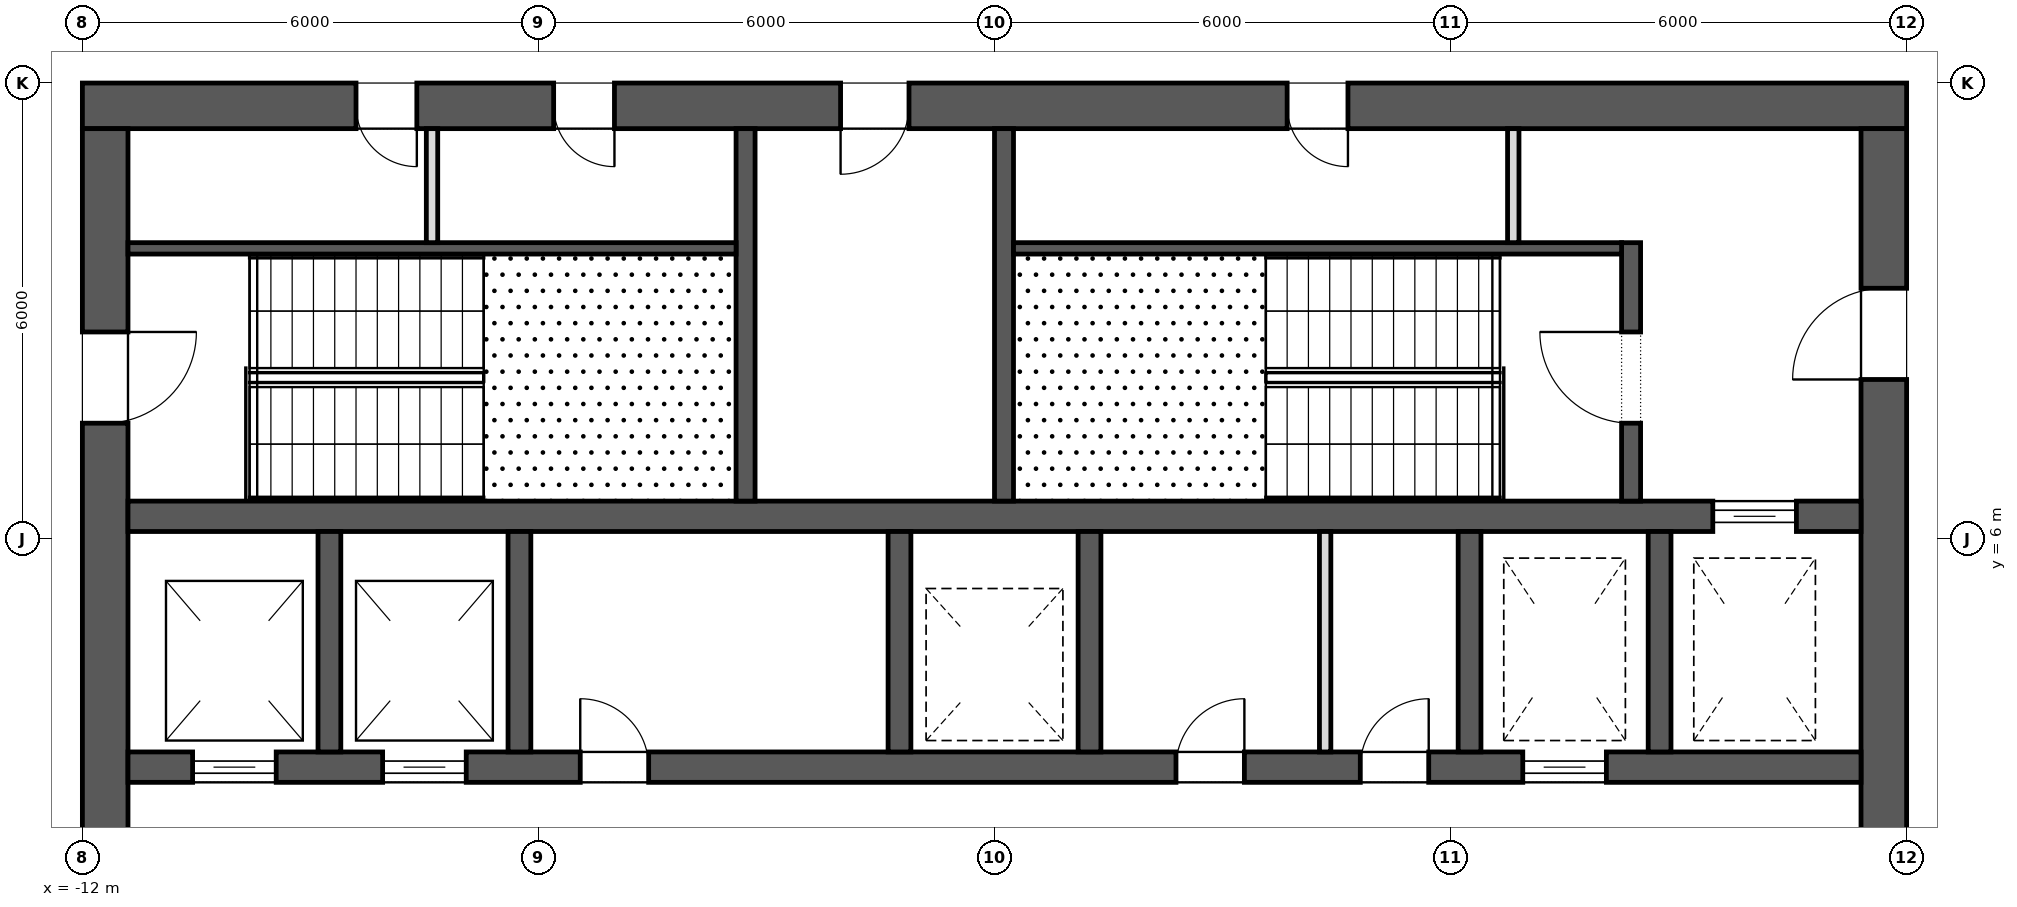
"""IFC4 building model, lengths in metres.
Left out: names, types, materials, properties, quantities, classifications, styles, units other than length and angle.
Written with IfcOpenShell. Run it as: python <this file> out.ifc"""

import sys

from ifc_helpers import new_model, si_unit, direction, frame, frame_2d, origin, place, context, subcontext, project, spatial, rectangle, extrude, element, fill, save


model = new_model("IFC4")
c1 = context("Model", 3, precision=1e-05, world=origin(), true_north=direction((0.0, 1.0)))
c2 = subcontext(c1, "Body", "Model", "MODEL_VIEW")
j1 = project(units=[si_unit("LENGTHUNIT", "METRE"), si_unit("PLANEANGLEUNIT", "RADIAN")], contexts=[c1])
p1 = place(None, origin())
s1 = spatial("IfcSite", under=j1, at=p1, CompositionType="ELEMENT")
p2 = place(p1, origin())
s2 = spatial("IfcBuilding", under=s1, at=p2, CompositionType="ELEMENT")
p3 = place(p2, frame((0.0, 0.0, 268.3)))
s3 = spatial("IfcBuildingStorey", under=s2, at=p3, CompositionType="ELEMENT", Elevation=268.3)
p4 = place(p3, frame((-12.0, 11.7, 0.0), z_axis=(0.0, 0.0, 1.0), x_axis=(1.0, 0.0, 0.0)))
e1 = element("IfcWall", 1, at=p4, inside=s3, PredefinedType="SHEAR", context=c2, shape_type="SweptSolid", body=[
    extrude(rectangle(XDim=24.0, YDim=0.6, at=frame_2d((12.0, 0.0))), origin(), (0.0, 0.0, 1.0), 4.0),
])
p5 = place(p4, frame((9.975, 0.0, 0.0)))
e2 = element("IfcOpeningElement", 2, at=p5, cuts=e1, PredefinedType="OPENING", context=c2, shape_type="SweptSolid", body=[
    extrude(rectangle(XDim=0.9, YDim=2.1, at=frame_2d((0.45, 1.05))), frame((0.0, 0.312, 0.0), z_axis=(0.0, -1.0, 0.0), x_axis=(1.0, 0.0, 0.0)), (0.0, 0.0, 1.0), 0.624),
])
p6 = place(p4, frame((3.6, 0.0, 0.0)))
e3 = element("IfcOpeningElement", 3, at=p6, cuts=e1, PredefinedType="OPENING", context=c2, shape_type="SweptSolid", body=[
    extrude(rectangle(XDim=0.8, YDim=2.1, at=frame_2d((0.4, 1.05))), frame((0.0, 0.312, 0.0), z_axis=(0.0, -1.0, 0.0), x_axis=(1.0, 0.0, 0.0)), (0.0, 0.0, 1.0), 0.624),
])
p7 = place(p4, frame((6.2, 0.0, 0.0)))
e4 = element("IfcOpeningElement", 4, at=p7, cuts=e1, PredefinedType="OPENING", context=c2, shape_type="SweptSolid", body=[
    extrude(rectangle(XDim=0.8, YDim=2.1, at=frame_2d((0.4, 1.05))), frame((0.0, 0.312, 0.0), z_axis=(0.0, -1.0, 0.0), x_axis=(1.0, 0.0, 0.0)), (0.0, 0.0, 1.0), 0.624),
])
p8 = place(p4, frame((15.85, 0.0, 0.0)))
e5 = element("IfcOpeningElement", 5, at=p8, cuts=e1, PredefinedType="OPENING", context=c2, shape_type="SweptSolid", body=[
    extrude(rectangle(XDim=0.8, YDim=2.1, at=frame_2d((0.4, 1.05))), frame((0.0, 0.312, 0.0), z_axis=(0.0, -1.0, 0.0), x_axis=(1.0, 0.0, 0.0)), (0.0, 0.0, 1.0), 0.624),
])
p9 = place(p3, frame((11.7, -11.4, 0.0), z_axis=(0.0, 0.0, 1.0), x_axis=(0.0, 1.0, 0.0)))
e6 = element("IfcWall", 6, at=p9, inside=s3, PredefinedType="SHEAR", context=c2, shape_type="SweptSolid", body=[
    extrude(rectangle(XDim=22.8, YDim=0.6, at=frame_2d((11.4, 0.0))), origin(), (0.0, 0.0, 1.0), 4.0),
])
p10 = place(p9, frame((10.2, 0.0, 0.0)))
e7 = element("IfcOpeningElement", 7, at=p10, cuts=e6, PredefinedType="OPENING", context=c2, shape_type="SweptSolid", body=[
    extrude(rectangle(XDim=2.4, YDim=2.1, at=frame_2d((1.2, 1.05))), frame((0.0, 0.312, 0.0), z_axis=(0.0, -1.0, 0.0), x_axis=(1.0, 0.0, 0.0)), (0.0, 0.0, 1.0), 0.624),
])
p11 = place(p9, frame((19.5, 0.0, 0.0)))
e8 = element("IfcOpeningElement", 8, at=p11, cuts=e6, PredefinedType="OPENING", context=c2, shape_type="SweptSolid", body=[
    extrude(rectangle(XDim=1.2, YDim=2.1, at=frame_2d((0.6, 1.05))), frame((0.0, 0.312, 0.0), z_axis=(0.0, -1.0, 0.0), x_axis=(1.0, 0.0, 0.0)), (0.0, 0.0, 1.0), 0.624),
])
p12 = place(p9, frame((2.1, 0.0, 0.0)))
e9 = element("IfcOpeningElement", 9, at=p12, cuts=e6, PredefinedType="OPENING", context=c2, shape_type="SweptSolid", body=[
    extrude(rectangle(XDim=1.2, YDim=2.1, at=frame_2d((0.6, 1.05))), frame((0.0, 0.312, 0.0), z_axis=(0.0, -1.0, 0.0), x_axis=(1.0, 0.0, 0.0)), (0.0, 0.0, 1.0), 0.624),
])
p13 = place(p3, frame((-11.7, -11.4, 0.0), z_axis=(0.0, 0.0, 1.0), x_axis=(0.0, 1.0, 0.0)))
e10 = element("IfcWall", 10, at=p13, inside=s3, PredefinedType="SHEAR", context=c2, shape_type="SweptSolid", body=[
    extrude(rectangle(XDim=22.8, YDim=0.6, at=frame_2d((11.4, 0.0))), origin(), (0.0, 0.0, 1.0), 4.0),
])
p14 = place(p13, frame((10.2, 0.0, 0.0)))
e11 = element("IfcOpeningElement", 11, at=p14, cuts=e10, PredefinedType="OPENING", context=c2, shape_type="SweptSolid", body=[
    extrude(rectangle(XDim=2.4, YDim=2.1, at=frame_2d((1.2, 1.05))), frame((0.0, 0.312, 0.0), z_axis=(0.0, -1.0, 0.0), x_axis=(1.0, 0.0, 0.0)), (0.0, 0.0, 1.0), 0.624),
])
p15 = place(p13, frame((18.925, 0.0, 0.0)))
e12 = element("IfcOpeningElement", 12, at=p15, cuts=e10, PredefinedType="OPENING", context=c2, shape_type="SweptSolid", body=[
    extrude(rectangle(XDim=1.2, YDim=2.1, at=frame_2d((0.6, 1.05))), frame((0.0, 0.312, 0.0), z_axis=(0.0, -1.0, 0.0), x_axis=(1.0, 0.0, 0.0)), (0.0, 0.0, 1.0), 0.624),
])
p16 = place(p13, frame((2.675, 0.0, 0.0)))
e13 = element("IfcOpeningElement", 13, at=p16, cuts=e10, PredefinedType="OPENING", context=c2, shape_type="SweptSolid", body=[
    extrude(rectangle(XDim=1.2, YDim=2.1, at=frame_2d((0.6, 1.05))), frame((0.0, 0.312, 0.0), z_axis=(0.0, -1.0, 0.0), x_axis=(1.0, 0.0, 0.0)), (0.0, 0.0, 1.0), 0.624),
])
p17 = place(p3, frame((-11.4, 3.0, 0.0), z_axis=(0.0, 0.0, 1.0), x_axis=(1.0, 0.0, 0.0)))
e14 = element("IfcWall", 14, at=p17, inside=s3, PredefinedType="SHEAR", context=c2, shape_type="SweptSolid", body=[
    extrude(rectangle(XDim=22.8, YDim=0.4, at=frame_2d((11.4, 0.0))), origin(), (0.0, 0.0, 1.0), 4.0),
])
p18 = place(p17, frame((0.85, 0.0, 0.0)))
e15 = element("IfcOpeningElement", 15, at=p18, cuts=e14, PredefinedType="OPENING", context=c2, shape_type="SweptSolid", body=[
    extrude(rectangle(XDim=1.1, YDim=2.1, at=frame_2d((0.55, 1.05))), frame((0.0, 0.212, 0.0), z_axis=(0.0, -1.0, 0.0), x_axis=(1.0, 0.0, 0.0)), (0.0, 0.0, 1.0), 0.424),
])
p19 = place(p17, frame((3.35, 0.0, 0.0)))
e16 = element("IfcOpeningElement", 16, at=p19, cuts=e14, PredefinedType="OPENING", context=c2, shape_type="SweptSolid", body=[
    extrude(rectangle(XDim=1.1, YDim=2.1, at=frame_2d((0.55, 1.05))), frame((0.0, 0.212, 0.0), z_axis=(0.0, -1.0, 0.0), x_axis=(1.0, 0.0, 0.0)), (0.0, 0.0, 1.0), 0.424),
])
p20 = place(p17, frame((18.35, 0.0, 0.0)))
e17 = element("IfcOpeningElement", 17, at=p20, cuts=e14, PredefinedType="OPENING", context=c2, shape_type="SweptSolid", body=[
    extrude(rectangle(XDim=1.1, YDim=2.1, at=frame_2d((0.55, 1.05))), frame((0.0, 0.212, 0.0), z_axis=(0.0, -1.0, 0.0), x_axis=(1.0, 0.0, 0.0)), (0.0, 0.0, 1.0), 0.424),
])
p21 = place(p17, frame((13.788, 0.0, 0.0)))
e18 = element("IfcOpeningElement", 18, at=p21, cuts=e14, PredefinedType="OPENING", context=c2, shape_type="SweptSolid", body=[
    extrude(rectangle(XDim=0.9, YDim=2.1, at=frame_2d((0.45, 1.05))), frame((0.0, 0.212, 0.0), z_axis=(0.0, -1.0, 0.0), x_axis=(1.0, 0.0, 0.0)), (0.0, 0.0, 1.0), 0.424),
])
p22 = place(p17, frame((16.212, 0.0, 0.0)))
e19 = element("IfcOpeningElement", 19, at=p22, cuts=e14, PredefinedType="OPENING", context=c2, shape_type="SweptSolid", body=[
    extrude(rectangle(XDim=0.9, YDim=2.1, at=frame_2d((0.45, 1.05))), frame((0.0, 0.212, 0.0), z_axis=(0.0, -1.0, 0.0), x_axis=(1.0, 0.0, 0.0)), (0.0, 0.0, 1.0), 0.424),
])
p23 = place(p17, frame((5.95, 0.0, 0.0)))
e20 = element("IfcOpeningElement", 20, at=p23, cuts=e14, PredefinedType="OPENING", context=c2, shape_type="SweptSolid", body=[
    extrude(rectangle(XDim=0.9, YDim=2.1, at=frame_2d((0.45, 1.05))), frame((0.0, 0.212, 0.0), z_axis=(0.0, -1.0, 0.0), x_axis=(1.0, 0.0, 0.0)), (0.0, 0.0, 1.0), 0.424),
])
p24 = place(p3, frame((-11.4, 6.3, 0.0), z_axis=(0.0, 0.0, 1.0), x_axis=(1.0, 0.0, 0.0)))
e21 = element("IfcWall", 21, at=p24, inside=s3, PredefinedType="SHEAR", context=c2, shape_type="SweptSolid", body=[
    extrude(rectangle(XDim=22.8, YDim=0.4, at=frame_2d((11.4, 0.0))), origin(), (0.0, 0.0, 1.0), 4.0),
])
p25 = place(p24, frame((20.85, 0.0, 0.0)))
e22 = element("IfcOpeningElement", 22, at=p25, cuts=e21, PredefinedType="OPENING", context=c2, shape_type="SweptSolid", body=[
    extrude(rectangle(XDim=1.1, YDim=2.1, at=frame_2d((0.55, 1.05))), frame((0.0, 0.212, 0.0), z_axis=(0.0, -1.0, 0.0), x_axis=(1.0, 0.0, 0.0)), (0.0, 0.0, 1.0), 0.424),
])
for number, where, z_axis, x_axis in (
    (23, (-8.75, 3.2, 0.0), (0.0, 0.0, 1.0), (0.0, 1.0, 0.0)),
    (24, (-6.25, 3.2, 0.0), (0.0, 0.0, 1.0), (0.0, 1.0, 0.0)),
    (25, (-1.25, 3.2, 0.0), (0.0, 0.0, 1.0), (0.0, 1.0, 0.0)),
    (26, (1.25, 3.2, 0.0), (0.0, 0.0, 1.0), (0.0, 1.0, 0.0)),
    (27, (6.25, 3.2, 0.0), (0.0, 0.0, 1.0), (0.0, 1.0, 0.0)),
    (28, (8.75, 3.2, 0.0), (0.0, 0.0, 1.0), (0.0, 1.0, 0.0)),
):
    element("IfcWall", number, at=place(p3, frame(where, z_axis=z_axis, x_axis=x_axis)), inside=s3, PredefinedType="SHEAR", context=c2, shape_type="SweptSolid", body=[
        extrude(rectangle(XDim=2.9, YDim=0.3, at=frame_2d((1.45, 0.0))), origin(), (0.0, 0.0, 1.0), 4.0),
    ])
for number, where, z_axis, x_axis in (
    (29, (-3.275, 6.5, 0.0), (0.0, 0.0, 1.0), (0.0, 1.0, 0.0)),
    (30, (0.125, 6.5, 0.0), (0.0, 0.0, 1.0), (0.0, 1.0, 0.0)),
):
    element("IfcWall", number, at=place(p3, frame(where, z_axis=z_axis, x_axis=x_axis)), inside=s3, PredefinedType="SHEAR", context=c2, shape_type="SweptSolid", body=[
        extrude(rectangle(XDim=4.9, YDim=0.25, at=frame_2d((2.45, 0.0))), origin(), (0.0, 0.0, 1.0), 3.7),
    ])
p26 = place(p3, frame((8.375, 6.5, 0.0), z_axis=(0.0, 0.0, 1.0), x_axis=(0.0, 1.0, 0.0)))
e31 = element("IfcWall", 31, at=p26, inside=s3, PredefinedType="SHEAR", context=c2, shape_type="SweptSolid", body=[
    extrude(rectangle(XDim=3.4, YDim=0.25, at=frame_2d((1.7, 0.0))), origin(), (0.0, 0.0, 1.0), 3.7),
])
p27 = place(p26, frame((1.025, 0.0, 0.0)))
e32 = element("IfcOpeningElement", 32, at=p27, cuts=e31, PredefinedType="OPENING", context=c2, shape_type="SweptSolid", body=[
    extrude(rectangle(XDim=1.2, YDim=2.1, at=frame_2d((0.6, 1.05))), frame((0.0, 0.137, 0.0), z_axis=(0.0, -1.0, 0.0), x_axis=(1.0, 0.0, 0.0)), (0.0, 0.0, 1.0), 0.274),
])
for number, where, z_axis, x_axis in (
    (33, (-11.4, 9.825, 0.0), (0.0, 0.0, 1.0), (1.0, 0.0, 0.0)),
    (34, (0.25, 9.825, 0.0), (0.0, 0.0, 1.0), (1.0, 0.0, 0.0)),
):
    element("IfcWall", number, at=place(p3, frame(where, z_axis=z_axis, x_axis=x_axis)), inside=s3, PredefinedType="SHEAR", context=c2, shape_type="SweptSolid", body=[
        extrude(rectangle(XDim=8.0, YDim=0.15, at=frame_2d((4.0, 0.0))), origin(), (0.0, 0.0, 1.0), 3.7),
    ])
for number, where, z_axis, x_axis in (
    (35, (-7.4, 9.9, 0.0), (0.0, 0.0, 1.0), (0.0, 1.0, 0.0)),
    (36, (6.825, 9.9, 0.0), (0.0, 0.0, 1.0), (0.0, 1.0, 0.0)),
):
    element("IfcWall", number, at=place(p3, frame(where, z_axis=z_axis, x_axis=x_axis)), inside=s3, PredefinedType="PARTITIONING", context=c2, shape_type="SweptSolid", body=[
        extrude(rectangle(XDim=1.5, YDim=0.15, at=frame_2d((0.75, 0.0))), origin(), (0.0, 0.0, 1.0), 3.7),
    ])
p28 = place(p3, frame((4.35, 3.2, 0.0), z_axis=(0.0, 0.0, 1.0), x_axis=(0.0, 1.0, 0.0)))
e37 = element("IfcWall", 37, at=p28, inside=s3, PredefinedType="PARTITIONING", context=c2, shape_type="SweptSolid", body=[
    extrude(rectangle(XDim=2.9, YDim=0.15, at=frame_2d((1.45, 0.0))), origin(), (0.0, 0.0, 1.0), 3.7),
])
p29 = place(p25, origin())
e38 = element("IfcDoor", 38, at=p29, inside=s3, OperationType="SLIDING_TO_LEFT", PredefinedType="DOOR", context=c2, shape_type="SweptSolid", body=[
    extrude(rectangle(XDim=1.1, YDim=2.1, at=frame_2d((0.55, 1.05))), frame((0.0, 0.025, 0.0), z_axis=(0.0, -1.0, 0.0), x_axis=(1.0, 0.0, 0.0)), (0.0, 0.0, 1.0), 0.05),
])
fill(e22, e38)
p30 = place(p18, origin())
e39 = element("IfcDoor", 39, at=p30, inside=s3, OperationType="SLIDING_TO_LEFT", PredefinedType="DOOR", context=c2, shape_type="SweptSolid", body=[
    extrude(rectangle(XDim=1.1, YDim=2.1, at=frame_2d((0.55, 1.05))), frame((0.0, 0.025, 0.0), z_axis=(0.0, -1.0, 0.0), x_axis=(1.0, 0.0, 0.0)), (0.0, 0.0, 1.0), 0.05),
])
fill(e15, e39)
p31 = place(p19, origin())
e40 = element("IfcDoor", 40, at=p31, inside=s3, OperationType="SLIDING_TO_LEFT", PredefinedType="DOOR", context=c2, shape_type="SweptSolid", body=[
    extrude(rectangle(XDim=1.1, YDim=2.1, at=frame_2d((0.55, 1.05))), frame((0.0, 0.025, 0.0), z_axis=(0.0, -1.0, 0.0), x_axis=(1.0, 0.0, 0.0)), (0.0, 0.0, 1.0), 0.05),
])
fill(e16, e40)
p32 = place(p20, origin())
e41 = element("IfcDoor", 41, at=p32, inside=s3, OperationType="SLIDING_TO_LEFT", PredefinedType="DOOR", context=c2, shape_type="SweptSolid", body=[
    extrude(rectangle(XDim=1.1, YDim=2.1, at=frame_2d((0.55, 1.05))), frame((0.0, 0.025, 0.0), z_axis=(0.0, -1.0, 0.0), x_axis=(1.0, 0.0, 0.0)), (0.0, 0.0, 1.0), 0.05),
])
fill(e17, e41)
p33 = place(p15, frame((1.2, 0.0, 0.0), z_axis=(0.0, 0.0, 1.0), x_axis=(-1.0, 0.0, 0.0)))
e42 = element("IfcDoor", 42, at=p33, inside=s3, OperationType="SINGLE_SWING_RIGHT", PredefinedType="DOOR", context=c2, shape_type="SweptSolid", body=[
    extrude(rectangle(XDim=1.2, YDim=2.1, at=frame_2d((0.6, 1.05))), frame((0.0, 0.025, 0.0), z_axis=(0.0, -1.0, 0.0), x_axis=(1.0, 0.0, 0.0)), (0.0, 0.0, 1.0), 0.05),
])
fill(e12, e42)
p34 = place(p27, origin())
e43 = element("IfcDoor", 43, at=p34, inside=s3, OperationType="SINGLE_SWING_LEFT", PredefinedType="DOOR", context=c2, shape_type="SweptSolid", body=[
    extrude(rectangle(XDim=1.2, YDim=2.1, at=frame_2d((0.6, 1.05))), frame((0.0, 0.025, 0.0), z_axis=(0.0, -1.0, 0.0), x_axis=(1.0, 0.0, 0.0)), (0.0, 0.0, 1.0), 0.05),
])
fill(e32, e43)
p35 = place(p11, origin())
e44 = element("IfcDoor", 44, at=p35, inside=s3, OperationType="SINGLE_SWING_RIGHT", PredefinedType="DOOR", context=c2, shape_type="SweptSolid", body=[
    extrude(rectangle(XDim=1.2, YDim=2.1, at=frame_2d((0.6, 1.05))), frame((0.0, 0.025, 0.0), z_axis=(0.0, -1.0, 0.0), x_axis=(1.0, 0.0, 0.0)), (0.0, 0.0, 1.0), 0.05),
])
fill(e8, e44)
p36 = place(p5, frame((0.9, 0.0, 0.0), z_axis=(0.0, 0.0, 1.0), x_axis=(-1.0, 0.0, 0.0)))
e45 = element("IfcDoor", 45, at=p36, inside=s3, OperationType="SINGLE_SWING_LEFT", PredefinedType="DOOR", context=c2, shape_type="SweptSolid", body=[
    extrude(rectangle(XDim=0.9, YDim=2.1, at=frame_2d((0.45, 1.05))), frame((0.0, 0.025, 0.0), z_axis=(0.0, -1.0, 0.0), x_axis=(1.0, 0.0, 0.0)), (0.0, 0.0, 1.0), 0.05),
])
fill(e2, e45)
p37 = place(p6, frame((0.8, 0.0, 0.0), z_axis=(0.0, 0.0, 1.0), x_axis=(-1.0, 0.0, 0.0)))
e46 = element("IfcDoor", 46, at=p37, inside=s3, OperationType="SINGLE_SWING_RIGHT", PredefinedType="DOOR", context=c2, shape_type="SweptSolid", body=[
    extrude(rectangle(XDim=0.8, YDim=2.1, at=frame_2d((0.4, 1.05))), frame((0.0, 0.025, 0.0), z_axis=(0.0, -1.0, 0.0), x_axis=(1.0, 0.0, 0.0)), (0.0, 0.0, 1.0), 0.05),
])
fill(e3, e46)
p38 = place(p7, frame((0.8, 0.0, 0.0), z_axis=(0.0, 0.0, 1.0), x_axis=(-1.0, 0.0, 0.0)))
e47 = element("IfcDoor", 47, at=p38, inside=s3, OperationType="SINGLE_SWING_RIGHT", PredefinedType="DOOR", context=c2, shape_type="SweptSolid", body=[
    extrude(rectangle(XDim=0.8, YDim=2.1, at=frame_2d((0.4, 1.05))), frame((0.0, 0.025, 0.0), z_axis=(0.0, -1.0, 0.0), x_axis=(1.0, 0.0, 0.0)), (0.0, 0.0, 1.0), 0.05),
])
fill(e4, e47)
p39 = place(p8, frame((0.8, 0.0, 0.0), z_axis=(0.0, 0.0, 1.0), x_axis=(-1.0, 0.0, 0.0)))
e48 = element("IfcDoor", 48, at=p39, inside=s3, OperationType="SINGLE_SWING_RIGHT", PredefinedType="DOOR", context=c2, shape_type="SweptSolid", body=[
    extrude(rectangle(XDim=0.8, YDim=2.1, at=frame_2d((0.4, 1.05))), frame((0.0, 0.025, 0.0), z_axis=(0.0, -1.0, 0.0), x_axis=(1.0, 0.0, 0.0)), (0.0, 0.0, 1.0), 0.05),
])
fill(e5, e48)
p40 = place(p21, origin())
e49 = element("IfcDoor", 49, at=p40, inside=s3, OperationType="SINGLE_SWING_LEFT", PredefinedType="DOOR", context=c2, shape_type="SweptSolid", body=[
    extrude(rectangle(XDim=0.9, YDim=2.1, at=frame_2d((0.45, 1.05))), frame((0.0, 0.025, 0.0), z_axis=(0.0, -1.0, 0.0), x_axis=(1.0, 0.0, 0.0)), (0.0, 0.0, 1.0), 0.05),
])
fill(e18, e49)
p41 = place(p22, origin())
e50 = element("IfcDoor", 50, at=p41, inside=s3, OperationType="SINGLE_SWING_LEFT", PredefinedType="DOOR", context=c2, shape_type="SweptSolid", body=[
    extrude(rectangle(XDim=0.9, YDim=2.1, at=frame_2d((0.45, 1.05))), frame((0.0, 0.025, 0.0), z_axis=(0.0, -1.0, 0.0), x_axis=(1.0, 0.0, 0.0)), (0.0, 0.0, 1.0), 0.05),
])
fill(e19, e50)
p42 = place(p23, origin())
e51 = element("IfcDoor", 51, at=p42, inside=s3, OperationType="SINGLE_SWING_RIGHT", PredefinedType="DOOR", context=c2, shape_type="SweptSolid", body=[
    extrude(rectangle(XDim=0.9, YDim=2.1, at=frame_2d((0.45, 1.05))), frame((0.0, 0.025, 0.0), z_axis=(0.0, -1.0, 0.0), x_axis=(1.0, 0.0, 0.0)), (0.0, 0.0, 1.0), 0.05),
])
fill(e20, e51)
save(model, sys.argv[1])
